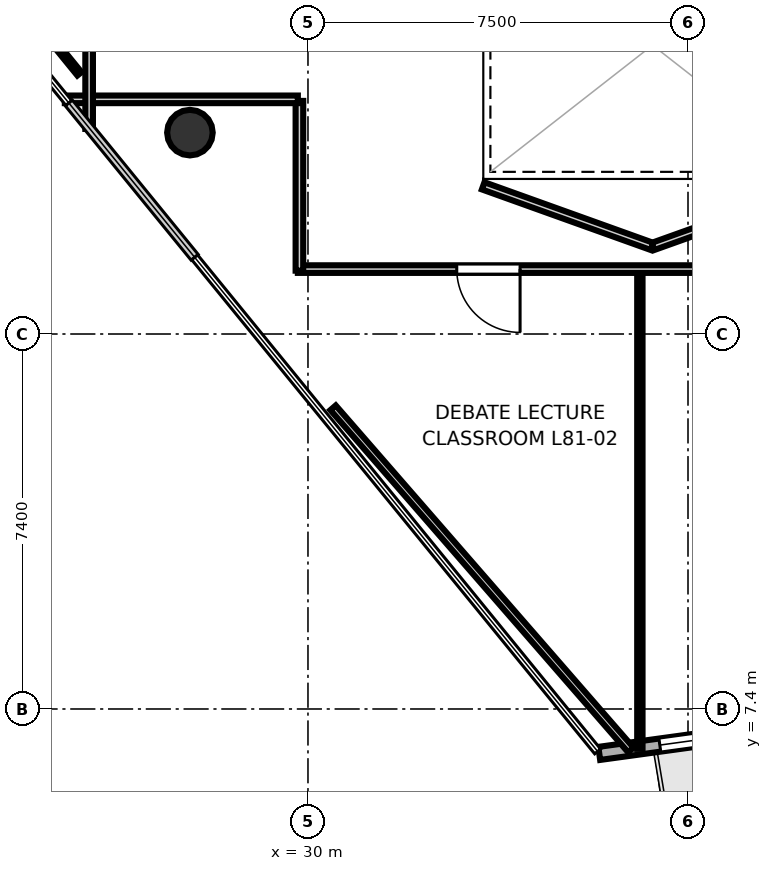
"""IFC4 building model, lengths in metres.
Left out: names, types, materials, properties, quantities, classifications, styles, units other than length and angle.
Written with IfcOpenShell. Run it as: python <this file> out.ifc"""

import sys

from ifc_helpers import new_model, si_unit, direction, frame, frame_2d, origin, origin_2d, place, context, subcontext, project, spatial, rectangle, hollow_circle, extrude, element, fill, save


model = new_model("IFC4")
c1 = context("Model", 3, precision=1e-05, world=origin(), true_north=direction((0.0, 1.0)))
c2 = subcontext(c1, "Body", "Model", "MODEL_VIEW")
j1 = project(units=[si_unit("LENGTHUNIT", "METRE"), si_unit("PLANEANGLEUNIT", "RADIAN")], contexts=[c1])
p1 = place(None, origin())
s1 = spatial("IfcSite", under=j1, at=p1, CompositionType="ELEMENT")
p2 = place(p1, origin())
s2 = spatial("IfcBuilding", under=s1, at=p2, CompositionType="ELEMENT")
p3 = place(p2, frame((0.0, 0.0, 313.9)))
s3 = spatial("IfcBuildingStorey", under=s2, at=p3, CompositionType="ELEMENT", Elevation=313.9)
p4 = place(p3, frame((27.67, 18.774, 0.0), z_axis=(0.0, 0.0, 1.0), x_axis=(1.0, 0.0, 0.0)))
e1 = element("IfcColumn", 1, at=p4, inside=s3, PredefinedType="COLUMN", context=c2, shape_type="SweptSolid", body=[
    extrude(hollow_circle(Radius=0.45, WallThickness=0.025, at=origin_2d()), origin(), (0.0, 0.0, 1.0), 3.7),
])
p5 = place(p3, frame((35.749, 6.523, 0.0), z_axis=(0.0, 0.0, 1.0), x_axis=(0.990716630133, 0.135943218944, 0.0)))
e2 = element("IfcWall", 2, at=p5, inside=s3, PredefinedType="SOLIDWALL", context=c2, shape_type="SweptSolid", body=[
    extrude(rectangle(XDim=4.213, YDim=0.26, at=frame_2d((2.106, 0.0))), origin(), (0.0, 0.0, 1.0), 3.52),
])
p6 = place(p5, frame((1.207, 0.0, 0.85)))
e3 = element("IfcOpeningElement", 3, at=p6, cuts=e2, PredefinedType="OPENING", context=c2, shape_type="SweptSolid", body=[
    extrude(rectangle(XDim=1.8, YDim=2.1, at=frame_2d((0.9, 1.05))), frame((0.0, 0.14, 0.0), z_axis=(0.0, -1.0, 0.0), x_axis=(1.0, 0.0, 0.0)), (0.0, 0.0, 1.0), 0.28),
])
p7 = place(p3, frame((33.458, 17.724, 0.0), z_axis=(0.0, 0.0, 1.0), x_axis=(0.94128854789, -0.337603124408, 0.0)))
e4 = element("IfcWall", 4, at=p7, inside=s3, PredefinedType="PARTITIONING", context=c2, shape_type="SweptSolid", body=[
    extrude(rectangle(XDim=3.54, YDim=0.15, at=frame_2d((1.77, 0.0))), origin(), (0.0, 0.0, 1.0), 2.84),
])
p8 = place(p3, frame((36.81, 16.529, 0.0), z_axis=(0.0, 0.0, 1.0), x_axis=(0.941548344365, 0.33687789364, 0.0)))
e5 = element("IfcWall", 5, at=p8, inside=s3, PredefinedType="PARTITIONING", context=c2, shape_type="SweptSolid", body=[
    extrude(rectangle(XDim=3.513, YDim=0.15, at=frame_2d((1.756, 0.0))), origin(), (0.0, 0.0, 1.0), 2.84),
])
p9 = place(p3, frame((42.65, 16.081, 0.0), z_axis=(0.0, 0.0, 1.0), x_axis=(-1.0, 0.0, 0.0)))
e6 = element("IfcWall", 6, at=p9, inside=s3, PredefinedType="PARTITIONING", context=c2, shape_type="SweptSolid", body=[
    extrude(rectangle(XDim=12.85, YDim=0.15, at=frame_2d((6.425, 0.0))), origin(), (0.0, 0.0, 1.0), 2.84),
])
p10 = place(p9, frame((8.464, 0.0, 0.0)))
e7 = element("IfcOpeningElement", 7, at=p10, cuts=e6, PredefinedType="OPENING", context=c2, shape_type="SweptSolid", body=[
    extrude(rectangle(XDim=1.25, YDim=2.2, at=frame_2d((0.625, 1.1))), frame((0.0, 0.085, 0.0), z_axis=(0.0, -1.0, 0.0), x_axis=(1.0, 0.0, 0.0)), (0.0, 0.0, 1.0), 0.17),
])
p11 = place(p3, frame((29.831, 16.05, 0.0), z_axis=(0.0, 0.0, 1.0), x_axis=(0.0, 1.0, 0.0)))
e8 = element("IfcWall", 8, at=p11, inside=s3, PredefinedType="PARTITIONING", context=c2, shape_type="SweptSolid", body=[
    extrude(rectangle(XDim=3.35, YDim=0.15, at=frame_2d((1.675, 0.0))), origin(), (0.0, 0.0, 1.0), 2.84),
])
p12 = place(p3, frame((29.8, 19.431, 0.0), z_axis=(0.0, 0.0, 1.0), x_axis=(-1.0, 0.0, 0.0)))
e9 = element("IfcWall", 9, at=p12, inside=s3, PredefinedType="PARTITIONING", context=c2, shape_type="SweptSolid", body=[
    extrude(rectangle(XDim=4.599, YDim=0.15, at=frame_2d((2.299, 0.0))), origin(), (0.0, 0.0, 1.0), 2.84),
])
p13 = place(p3, frame((25.681, 18.847, 0.0), z_axis=(0.0, 0.0, 1.0), x_axis=(0.0, 1.0, 0.0)))
e10 = element("IfcWall", 10, at=p13, inside=s3, PredefinedType="PARTITIONING", context=c2, shape_type="SweptSolid", body=[
    extrude(rectangle(XDim=13.703, YDim=0.15, at=frame_2d((6.851, 0.0))), origin(), (0.0, 0.0, 1.0), 2.84),
])
p14 = place(p13, frame((4.476, 0.0, 0.0)))
e11 = element("IfcOpeningElement", 11, at=p14, cuts=e10, PredefinedType="OPENING", context=c2, shape_type="SweptSolid", body=[
    extrude(rectangle(XDim=1.25, YDim=2.2, at=frame_2d((0.625, 1.1))), frame((0.0, 0.085, 0.0), z_axis=(0.0, -1.0, 0.0), x_axis=(1.0, 0.0, 0.0)), (0.0, 0.0, 1.0), 0.17),
])
p15 = place(p13, frame((10.628, 0.0, 0.0)))
e12 = element("IfcOpeningElement", 12, at=p15, cuts=e10, PredefinedType="OPENING", context=c2, shape_type="SweptSolid", body=[
    extrude(rectangle(XDim=0.9, YDim=2.1, at=frame_2d((0.45, 1.05))), frame((0.0, 0.085, 0.0), z_axis=(0.0, -1.0, 0.0), x_axis=(1.0, 0.0, 0.0)), (0.0, 0.0, 1.0), 0.17),
])
p16 = place(p3, frame((25.489, 19.935, 0.0), z_axis=(0.0, 0.0, 1.0), x_axis=(-0.632036778689, 0.774938391348, 0.0)))
e13 = element("IfcWall", 13, at=p16, inside=s3, PredefinedType="PARTITIONING", context=c2, shape_type="SweptSolid", body=[
    extrude(rectangle(XDim=10.379, YDim=0.105, at=frame_2d((5.189, 0.0))), origin(), (0.0, 0.0, 1.0), 2.84),
])
p17 = place(p3, frame((36.55, 15.971, 0.0), z_axis=(0.0, 0.0, 1.0), x_axis=(0.0, -1.0, 0.0)))
e14 = element("IfcWall", 14, at=p17, inside=s3, PredefinedType="PARTITIONING", context=c2, shape_type="SweptSolid", body=[
    extrude(rectangle(XDim=9.357, YDim=0.105, at=frame_2d((4.679, 0.0))), origin(), (0.0, 0.0, 1.0), 2.84),
])
p18 = place(p3, frame((36.372, 6.592, 0.0), z_axis=(0.0, 0.0, 1.0), x_axis=(-0.656482520453, 0.754341236007, 0.0)))
e15 = element("IfcWall", 15, at=p18, inside=s3, PredefinedType="PARTITIONING", context=c2, shape_type="SweptSolid", body=[
    extrude(rectangle(XDim=8.951, YDim=0.14, at=frame_2d((4.476, 0.0))), origin(), (0.0, 0.0, 1.0), 2.84),
])
p19 = place(p10, origin())
e16 = element("IfcDoor", 16, at=p19, inside=s3, OperationType="SINGLE_SWING_LEFT", PredefinedType="DOOR", context=c2, shape_type="SweptSolid", body=[
    extrude(rectangle(XDim=1.25, YDim=2.2, at=frame_2d((0.625, 1.1))), frame((0.0, 0.025, 0.0), z_axis=(0.0, -1.0, 0.0), x_axis=(1.0, 0.0, 0.0)), (0.0, 0.0, 1.0), 0.05),
])
fill(e7, e16)
p20 = place(p6, origin())
e17 = element("IfcWindow", 17, at=p20, inside=s3, PartitioningType="SINGLE_PANEL", PredefinedType="WINDOW", context=c2, shape_type="SweptSolid", body=[
    extrude(rectangle(XDim=1.8, YDim=2.1, at=frame_2d((0.9, 1.05))), frame((0.0, 0.03, 0.0), z_axis=(0.0, -1.0, 0.0), x_axis=(1.0, 0.0, 0.0)), (0.0, 0.0, 1.0), 0.06),
])
fill(e3, e17)
save(model, sys.argv[1])
